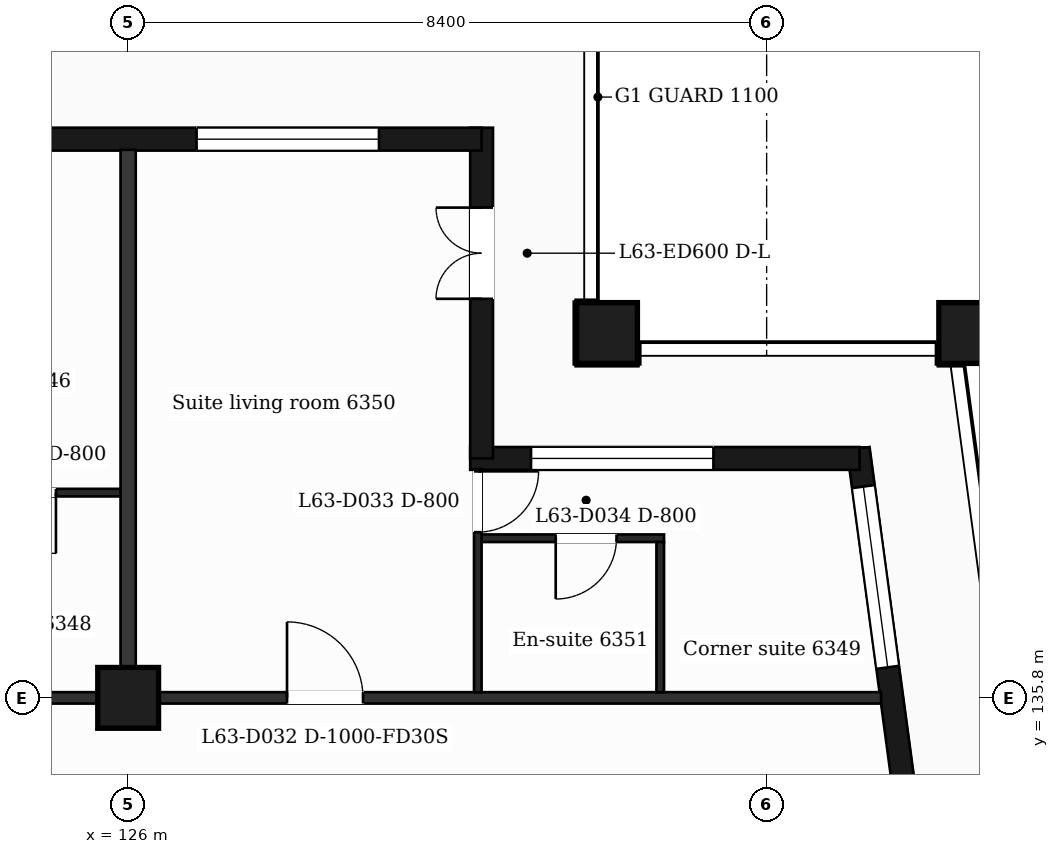
"""IFC4 building model, lengths in metres.
Left out: names, types, materials, properties, quantities, classifications, styles, units other than length and angle.
Written with IfcOpenShell. Run it as: python <this file> out.ifc"""

import sys

from ifc_helpers import new_model, si_unit, direction, frame, frame_2d, origin, origin_2d, place, context, subcontext, project, spatial, rectangle, extrude, element, fill, save


model = new_model("IFC4")
c1 = context("Model", 3, precision=1e-05, world=origin(), true_north=direction((0.0, 1.0)))
c2 = subcontext(c1, "Body", "Model", "MODEL_VIEW")
j1 = project(units=[si_unit("LENGTHUNIT", "METRE"), si_unit("PLANEANGLEUNIT", "RADIAN")], contexts=[c1])
p1 = place(None, origin())
s1 = spatial("IfcSite", under=j1, at=p1, CompositionType="ELEMENT")
p2 = place(p1, origin())
s2 = spatial("IfcBuilding", under=s1, at=p2, CompositionType="ELEMENT")
p3 = place(p2, frame((0.0, 0.0, 262.7)))
s3 = spatial("IfcBuildingStorey", under=s2, at=p3, CompositionType="ELEMENT", Elevation=262.7)
for number, where, z_axis, x_axis in (
    (1, (132.3, 140.6, 0.0), (0.0, 0.0, 1.0), (1.0, 0.0, 0.0)),
    (2, (137.065, 140.6, 0.0), (0.0, 0.0, 1.0), (1.0, 0.0, 0.0)),
    (3, (126.0, 135.8, 0.0), (0.0, 0.0, 1.0), (1.0, 0.0, 0.0)),
):
    element("IfcColumn", number, at=place(p3, frame(where, z_axis=z_axis, x_axis=x_axis)), inside=s3, PredefinedType="COLUMN", context=c2, shape_type="SweptSolid", body=[
        extrude(rectangle(XDim=0.8, YDim=0.8, at=origin_2d()), origin(), (0.0, 0.0, 1.0), 3.7),
    ])
p4 = place(p3, frame((136.504, 132.4, 0.0), z_axis=(0.0, 0.0, 1.0), x_axis=(-0.133399697462, 0.99106231929, 0.0)))
e4 = element("IfcWall", 4, at=p4, inside=s3, PredefinedType="SOLIDWALL", context=c2, shape_type="SweptSolid", body=[
    extrude(rectangle(XDim=6.74, YDim=0.3, at=frame_2d((3.37, 0.0))), origin(), (0.0, 0.0, 1.0), 3.38),
])
p5 = place(p4, frame((1.115, 0.0, 0.0)))
e5 = element("IfcOpeningElement", 5, at=p5, cuts=e4, PredefinedType="OPENING", context=c2, shape_type="SweptSolid", body=[
    extrude(rectangle(XDim=1.2, YDim=2.4, at=frame_2d((0.6, 1.2))), frame((0.0, 0.16, 0.0), z_axis=(0.0, -1.0, 0.0), x_axis=(1.0, 0.0, 0.0)), (0.0, 0.0, 1.0), 0.32),
])
p6 = place(p4, frame((3.835, 0.0, 0.9)))
e6 = element("IfcOpeningElement", 6, at=p6, cuts=e4, PredefinedType="OPENING", context=c2, shape_type="SweptSolid", body=[
    extrude(rectangle(XDim=2.4, YDim=2.1, at=frame_2d((1.2, 1.05))), frame((0.0, 0.16, 0.0), z_axis=(0.0, -1.0, 0.0), x_axis=(1.0, 0.0, 0.0)), (0.0, 0.0, 1.0), 0.32),
])
p7 = place(p3, frame((135.623, 138.95, 0.0), z_axis=(0.0, 0.0, 1.0), x_axis=(-1.0, 0.0, 0.0)))
e7 = element("IfcWall", 7, at=p7, inside=s3, PredefinedType="SOLIDWALL", context=c2, shape_type="SweptSolid", body=[
    extrude(rectangle(XDim=5.123, YDim=0.3, at=frame_2d((2.561, 0.0))), origin(), (0.0, 0.0, 1.0), 3.38),
])
p8 = place(p7, frame((1.923, 0.0, 0.9)))
e8 = element("IfcOpeningElement", 8, at=p8, cuts=e7, PredefinedType="OPENING", context=c2, shape_type="SweptSolid", body=[
    extrude(rectangle(XDim=2.4, YDim=2.1, at=frame_2d((1.2, 1.05))), frame((0.0, 0.16, 0.0), z_axis=(0.0, -1.0, 0.0), x_axis=(1.0, 0.0, 0.0)), (0.0, 0.0, 1.0), 0.32),
])
p9 = place(p3, frame((130.65, 138.95, 0.0), z_axis=(0.0, 0.0, 1.0), x_axis=(0.0, 1.0, 0.0)))
e9 = element("IfcWall", 9, at=p9, inside=s3, PredefinedType="SOLIDWALL", context=c2, shape_type="SweptSolid", body=[
    extrude(rectangle(XDim=4.35, YDim=0.3, at=frame_2d((2.175, 0.0))), origin(), (0.0, 0.0, 1.0), 3.38),
])
p10 = place(p9, frame((2.1, 0.0, 0.0)))
e10 = element("IfcOpeningElement", 10, at=p10, cuts=e9, PredefinedType="OPENING", context=c2, shape_type="SweptSolid", body=[
    extrude(rectangle(XDim=1.2, YDim=2.4, at=frame_2d((0.6, 1.2))), frame((0.0, 0.16, 0.0), z_axis=(0.0, -1.0, 0.0), x_axis=(1.0, 0.0, 0.0)), (0.0, 0.0, 1.0), 0.32),
])
p11 = place(p3, frame((130.65, 143.15, 0.0), z_axis=(0.0, 0.0, 1.0), x_axis=(-1.0, 0.0, 0.0)))
e11 = element("IfcWall", 11, at=p11, inside=s3, PredefinedType="SOLIDWALL", context=c2, shape_type="SweptSolid", body=[
    extrude(rectangle(XDim=14.25, YDim=0.3, at=frame_2d((7.125, 0.0))), origin(), (0.0, 0.0, 1.0), 3.38),
])
p12 = place(p11, frame((1.35, 0.0, 0.9)))
e12 = element("IfcOpeningElement", 12, at=p12, cuts=e11, PredefinedType="OPENING", context=c2, shape_type="SweptSolid", body=[
    extrude(rectangle(XDim=2.4, YDim=2.1, at=frame_2d((1.2, 1.05))), frame((0.0, 0.16, 0.0), z_axis=(0.0, -1.0, 0.0), x_axis=(1.0, 0.0, 0.0)), (0.0, 0.0, 1.0), 0.32),
])
p13 = place(p11, frame((6.15, 0.0, 0.0)))
e13 = element("IfcOpeningElement", 13, at=p13, cuts=e11, PredefinedType="OPENING", context=c2, shape_type="SweptSolid", body=[
    extrude(rectangle(XDim=1.2, YDim=2.4, at=frame_2d((0.6, 1.2))), frame((0.0, 0.16, 0.0), z_axis=(0.0, -1.0, 0.0), x_axis=(1.0, 0.0, 0.0)), (0.0, 0.0, 1.0), 0.32),
])
p14 = place(p11, frame((9.75, 0.0, 0.9)))
e14 = element("IfcOpeningElement", 14, at=p14, cuts=e11, PredefinedType="OPENING", context=c2, shape_type="SweptSolid", body=[
    extrude(rectangle(XDim=2.4, YDim=2.1, at=frame_2d((1.2, 1.05))), frame((0.0, 0.16, 0.0), z_axis=(0.0, -1.0, 0.0), x_axis=(1.0, 0.0, 0.0)), (0.0, 0.0, 1.0), 0.32),
])
p15 = place(p3, frame((90.895, 135.8, 0.0), z_axis=(0.0, 0.0, 1.0), x_axis=(1.0, 0.0, 0.0)))
e15 = element("IfcWall", 15, at=p15, inside=s3, PredefinedType="PARTITIONING", context=c2, shape_type="SweptSolid", body=[
    extrude(rectangle(XDim=45.011, YDim=0.15, at=frame_2d((22.505, 0.0))), origin(), (0.0, 0.0, 1.0), 3.38),
])
p16 = place(p15, frame((8.005, 0.0, 0.0)))
e16 = element("IfcOpeningElement", 16, at=p16, cuts=e15, PredefinedType="OPENING", context=c2, shape_type="SweptSolid", body=[
    extrude(rectangle(XDim=1.0, YDim=2.1, at=frame_2d((0.5, 1.05))), frame((0.0, 0.085, 0.0), z_axis=(0.0, -1.0, 0.0), x_axis=(1.0, 0.0, 0.0)), (0.0, 0.0, 1.0), 0.17),
])
p17 = place(p15, frame((11.93, 0.0, 0.0)))
e17 = element("IfcOpeningElement", 17, at=p17, cuts=e15, PredefinedType="OPENING", context=c2, shape_type="SweptSolid", body=[
    extrude(rectangle(XDim=1.0, YDim=2.1, at=frame_2d((0.5, 1.05))), frame((0.0, 0.085, 0.0), z_axis=(0.0, -1.0, 0.0), x_axis=(1.0, 0.0, 0.0)), (0.0, 0.0, 1.0), 0.17),
])
p18 = place(p15, frame((22.755, 0.0, 0.0)))
e18 = element("IfcOpeningElement", 18, at=p18, cuts=e15, PredefinedType="OPENING", context=c2, shape_type="SweptSolid", body=[
    extrude(rectangle(XDim=1.0, YDim=2.1, at=frame_2d((0.5, 1.05))), frame((0.0, 0.085, 0.0), z_axis=(0.0, -1.0, 0.0), x_axis=(1.0, 0.0, 0.0)), (0.0, 0.0, 1.0), 0.17),
])
p19 = place(p15, frame((28.305, 0.0, 0.0)))
e19 = element("IfcOpeningElement", 19, at=p19, cuts=e15, PredefinedType="OPENING", context=c2, shape_type="SweptSolid", body=[
    extrude(rectangle(XDim=1.0, YDim=2.1, at=frame_2d((0.5, 1.05))), frame((0.0, 0.085, 0.0), z_axis=(0.0, -1.0, 0.0), x_axis=(1.0, 0.0, 0.0)), (0.0, 0.0, 1.0), 0.17),
])
p20 = place(p15, frame((37.195, 0.0, 0.0)))
e20 = element("IfcOpeningElement", 20, at=p20, cuts=e15, PredefinedType="OPENING", context=c2, shape_type="SweptSolid", body=[
    extrude(rectangle(XDim=1.0, YDim=2.1, at=frame_2d((0.5, 1.05))), frame((0.0, 0.085, 0.0), z_axis=(0.0, -1.0, 0.0), x_axis=(1.0, 0.0, 0.0)), (0.0, 0.0, 1.0), 0.17),
])
p21 = place(p3, frame((130.6, 137.9, 0.0), z_axis=(0.0, 0.0, 1.0), x_axis=(1.0, 0.0, 0.0)))
e21 = element("IfcWall", 21, at=p21, inside=s3, PredefinedType="PARTITIONING", context=c2, shape_type="SweptSolid", body=[
    extrude(rectangle(XDim=2.45, YDim=0.1, at=frame_2d((1.225, 0.0))), origin(), (0.0, 0.0, 1.0), 3.38),
])
p22 = place(p21, frame((1.025, 0.0, 0.0)))
e22 = element("IfcOpeningElement", 22, at=p22, cuts=e21, PredefinedType="OPENING", context=c2, shape_type="SweptSolid", body=[
    extrude(rectangle(XDim=0.8, YDim=2.1, at=frame_2d((0.4, 1.05))), frame((0.0, 0.06, 0.0), z_axis=(0.0, -1.0, 0.0), x_axis=(1.0, 0.0, 0.0)), (0.0, 0.0, 1.0), 0.12),
])
p23 = place(p3, frame((123.25, 138.5, 0.0), z_axis=(0.0, 0.0, 1.0), x_axis=(1.0, 0.0, 0.0)))
e23 = element("IfcWall", 23, at=p23, inside=s3, PredefinedType="PARTITIONING", context=c2, shape_type="SweptSolid", body=[
    extrude(rectangle(XDim=2.75, YDim=0.1, at=frame_2d((1.375, 0.0))), origin(), (0.0, 0.0, 1.0), 3.38),
])
p24 = place(p23, frame((1.0, 0.0, 0.0)))
e24 = element("IfcOpeningElement", 24, at=p24, cuts=e23, PredefinedType="OPENING", context=c2, shape_type="SweptSolid", body=[
    extrude(rectangle(XDim=0.8, YDim=2.1, at=frame_2d((0.4, 1.05))), frame((0.0, 0.06, 0.0), z_axis=(0.0, -1.0, 0.0), x_axis=(1.0, 0.0, 0.0)), (0.0, 0.0, 1.0), 0.12),
])
p25 = place(p3, frame((126.0, 135.875, 0.0), z_axis=(0.0, 0.0, 1.0), x_axis=(0.0, 1.0, 0.0)))
e25 = element("IfcWall", 25, at=p25, inside=s3, PredefinedType="PARTITIONING", context=c2, shape_type="SweptSolid", body=[
    extrude(rectangle(XDim=7.135, YDim=0.2, at=frame_2d((3.567, 0.0))), origin(), (0.0, 0.0, 1.0), 3.38),
])
p26 = place(p3, frame((130.6, 135.875, 0.0), z_axis=(0.0, 0.0, 1.0), x_axis=(0.0, 1.0, 0.0)))
e26 = element("IfcWall", 26, at=p26, inside=s3, PredefinedType="PARTITIONING", context=c2, shape_type="SweptSolid", body=[
    extrude(rectangle(XDim=2.935, YDim=0.1, at=frame_2d((1.468, 0.0))), origin(), (0.0, 0.0, 1.0), 3.38),
])
p27 = place(p26, frame((2.105, 0.0, 0.0)))
e27 = element("IfcOpeningElement", 27, at=p27, cuts=e26, PredefinedType="OPENING", context=c2, shape_type="SweptSolid", body=[
    extrude(rectangle(XDim=0.8, YDim=2.1, at=frame_2d((0.4, 1.05))), frame((0.0, 0.06, 0.0), z_axis=(0.0, -1.0, 0.0), x_axis=(1.0, 0.0, 0.0)), (0.0, 0.0, 1.0), 0.12),
])
p28 = place(p3, frame((133.0, 135.875, 0.0), z_axis=(0.0, 0.0, 1.0), x_axis=(0.0, 1.0, 0.0)))
e28 = element("IfcWall", 28, at=p28, inside=s3, PredefinedType="PARTITIONING", context=c2, shape_type="SweptSolid", body=[
    extrude(rectangle(XDim=1.975, YDim=0.1, at=frame_2d((0.988, 0.0))), origin(), (0.0, 0.0, 1.0), 3.38),
])
p29 = place(p6, origin())
e29 = element("IfcWindow", 29, at=p29, inside=s3, PartitioningType="SINGLE_PANEL", PredefinedType="WINDOW", context=c2, shape_type="SweptSolid", body=[
    extrude(rectangle(XDim=2.4, YDim=2.1, at=frame_2d((1.2, 1.05))), frame((0.0, 0.03, 0.0), z_axis=(0.0, -1.0, 0.0), x_axis=(1.0, 0.0, 0.0)), (0.0, 0.0, 1.0), 0.06),
])
fill(e6, e29)
p30 = place(p8, origin())
e30 = element("IfcWindow", 30, at=p30, inside=s3, PartitioningType="SINGLE_PANEL", PredefinedType="WINDOW", context=c2, shape_type="SweptSolid", body=[
    extrude(rectangle(XDim=2.4, YDim=2.1, at=frame_2d((1.2, 1.05))), frame((0.0, 0.03, 0.0), z_axis=(0.0, -1.0, 0.0), x_axis=(1.0, 0.0, 0.0)), (0.0, 0.0, 1.0), 0.06),
])
fill(e8, e30)
p31 = place(p10, origin())
e31 = element("IfcDoor", 31, at=p31, inside=s3, OperationType="DOUBLE_DOOR_SINGLE_SWING", PredefinedType="DOOR", context=c2, shape_type="SweptSolid", body=[
    extrude(rectangle(XDim=1.2, YDim=2.4, at=frame_2d((0.6, 1.2))), frame((0.0, 0.025, 0.0), z_axis=(0.0, -1.0, 0.0), x_axis=(1.0, 0.0, 0.0)), (0.0, 0.0, 1.0), 0.05),
])
fill(e10, e31)
p32 = place(p12, origin())
e32 = element("IfcWindow", 32, at=p32, inside=s3, PartitioningType="SINGLE_PANEL", PredefinedType="WINDOW", context=c2, shape_type="SweptSolid", body=[
    extrude(rectangle(XDim=2.4, YDim=2.1, at=frame_2d((1.2, 1.05))), frame((0.0, 0.03, 0.0), z_axis=(0.0, -1.0, 0.0), x_axis=(1.0, 0.0, 0.0)), (0.0, 0.0, 1.0), 0.06),
])
fill(e12, e32)
p33 = place(p24, origin())
e33 = element("IfcDoor", 33, at=p33, inside=s3, OperationType="SINGLE_SWING_RIGHT", PredefinedType="DOOR", context=c2, shape_type="SweptSolid", body=[
    extrude(rectangle(XDim=0.8, YDim=2.1, at=frame_2d((0.4, 1.05))), frame((0.0, 0.025, 0.0), z_axis=(0.0, -1.0, 0.0), x_axis=(1.0, 0.0, 0.0)), (0.0, 0.0, 1.0), 0.05),
])
fill(e24, e33)
p34 = place(p20, origin())
e34 = element("IfcDoor", 34, at=p34, inside=s3, OperationType="SINGLE_SWING_LEFT", PredefinedType="DOOR", context=c2, shape_type="SweptSolid", body=[
    extrude(rectangle(XDim=1.0, YDim=2.1, at=frame_2d((0.5, 1.05))), frame((0.0, 0.025, 0.0), z_axis=(0.0, -1.0, 0.0), x_axis=(1.0, 0.0, 0.0)), (0.0, 0.0, 1.0), 0.05),
])
fill(e20, e34)
p35 = place(p27, origin())
e35 = element("IfcDoor", 35, at=p35, inside=s3, OperationType="SINGLE_SWING_RIGHT", PredefinedType="DOOR", context=c2, shape_type="SweptSolid", body=[
    extrude(rectangle(XDim=0.8, YDim=2.1, at=frame_2d((0.4, 1.05))), frame((0.0, 0.025, 0.0), z_axis=(0.0, -1.0, 0.0), x_axis=(1.0, 0.0, 0.0)), (0.0, 0.0, 1.0), 0.05),
])
fill(e27, e35)
p36 = place(p22, origin())
e36 = element("IfcDoor", 36, at=p36, inside=s3, OperationType="SINGLE_SWING_LEFT", PredefinedType="DOOR", context=c2, shape_type="SweptSolid", body=[
    extrude(rectangle(XDim=0.8, YDim=2.1, at=frame_2d((0.4, 1.05))), frame((0.0, 0.025, 0.0), z_axis=(0.0, -1.0, 0.0), x_axis=(1.0, 0.0, 0.0)), (0.0, 0.0, 1.0), 0.05),
])
fill(e22, e36)
save(model, sys.argv[1])
